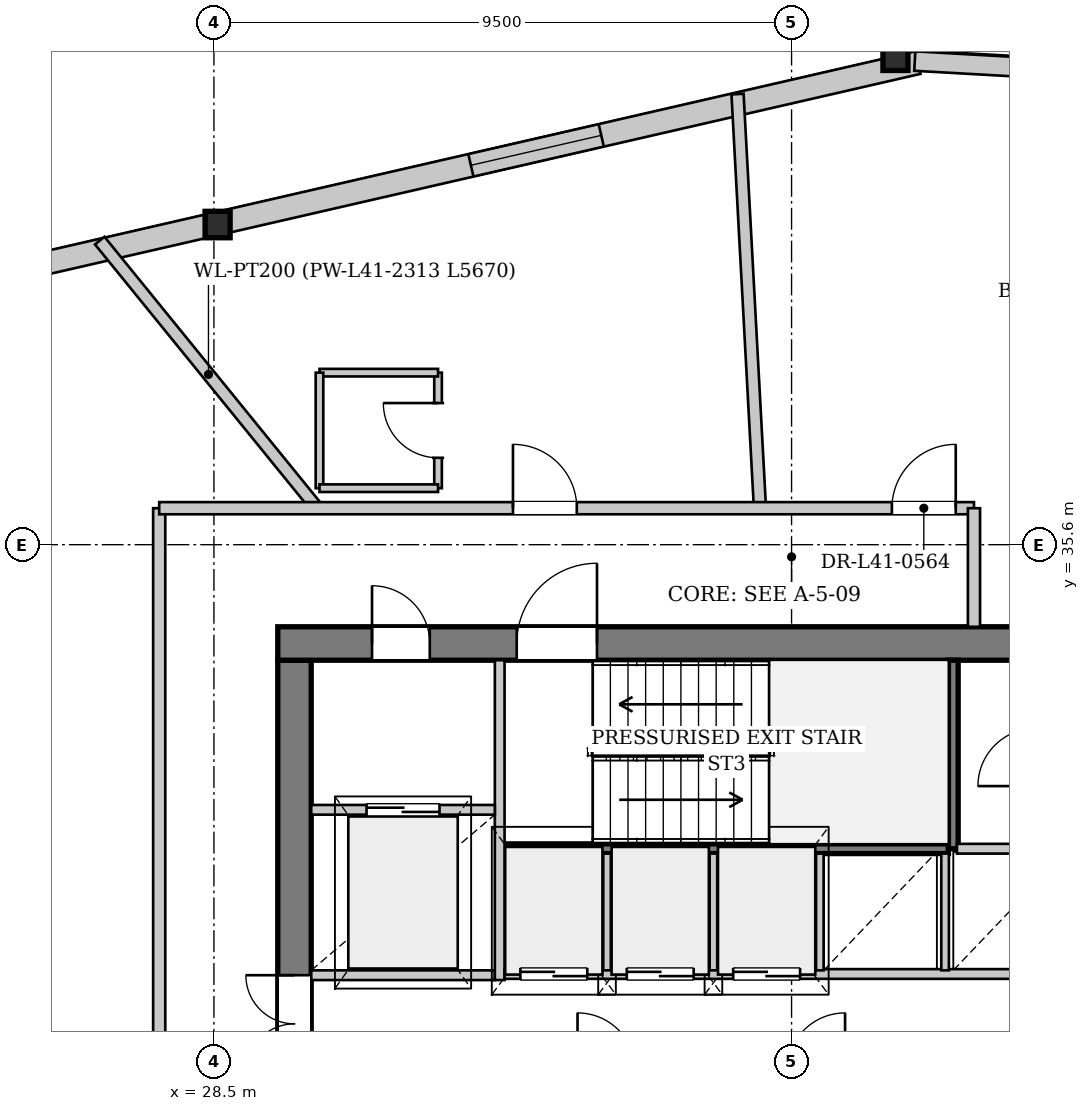
"""IFC4 building model, lengths in metres.
Left out: names, types, materials, properties, quantities, classifications, styles, units other than length and angle.
Written with IfcOpenShell. Run it as: python <this file> out.ifc"""

import sys

from ifc_helpers import new_model, si_unit, direction, frame, frame_2d, origin, origin_2d, place, context, subcontext, project, spatial, rectangle, i_section, extrude, source, transform, mapped, element, fill, save


model = new_model("IFC4")
c1 = context("Model", 3, precision=1e-05, world=origin(), true_north=direction((0.0, 1.0)))
c2 = subcontext(c1, "Body", "Model", "MODEL_VIEW")
j1 = project(units=[si_unit("LENGTHUNIT", "METRE"), si_unit("PLANEANGLEUNIT", "RADIAN")], contexts=[c1])
p1 = place(None, origin())
s1 = spatial("IfcSite", under=j1, at=p1, CompositionType="ELEMENT")
p2 = place(p1, origin())
s2 = spatial("IfcBuilding", under=s1, at=p2, CompositionType="ELEMENT")
p3 = place(p2, frame((0.0, 0.0, 157.25)))
s3 = spatial("IfcBuildingStorey", under=s2, at=p3, CompositionType="ELEMENT", Elevation=157.25)
m1 = source(origin(), c2, "Body", "SweptSolid", [
    extrude(i_section(OverallWidth=0.412, OverallDepth=0.435, WebThickness=0.031, FlangeThickness=0.05, at=origin_2d()), origin(), (0.0, 0.0, 1.0), 3.453),
])
p4 = place(p3, frame((40.035, 43.713, 0.0), z_axis=(-0.189343347232, -0.056209096733, 0.980300787668), x_axis=(0.284588007849, -0.958649918264, 0.0)))
e1 = element("IfcColumn", 1, at=p4, inside=s3, PredefinedType="COLUMN", context=c2, shape_type="MappedRepresentation", body=[
    mapped(m1, transform((0.0, 0.0, 0.0), x_axis=(1.0, 0.0, 0.0), y_axis=(0.0, 1.0, 0.0), z_axis=(0.0, 0.0, 1.0), scale=1.0)),
])
m2 = source(origin(), c2, "Body", "SweptSolid", [
    extrude(i_section(OverallWidth=0.412, OverallDepth=0.435, WebThickness=0.031, FlangeThickness=0.05, at=origin_2d()), origin(), (0.0, 0.0, 1.0), 3.468),
])
p5 = place(p3, frame((28.821, 41.136, 0.0), z_axis=(-0.150241736918, -0.156718887713, 0.97614886709), x_axis=(0.721866695766, -0.692032133317, 0.0)))
e2 = element("IfcColumn", 2, at=p5, inside=s3, PredefinedType="COLUMN", context=c2, shape_type="MappedRepresentation", body=[
    mapped(m2, transform((0.0, 0.0, 0.0), x_axis=(1.0, 0.0, 0.0), y_axis=(0.0, 1.0, 0.0), z_axis=(0.0, 0.0, 1.0), scale=1.0)),
])
p6 = place(p3, frame((17.649, 38.375, 0.0), z_axis=(0.0, 0.0, 1.0), x_axis=(0.974613320318, 0.223894787475, 0.0)))
e3 = element("IfcWall", 3, at=p6, inside=s3, PredefinedType="SOLIDWALL", context=c2, shape_type="SweptSolid", body=[
    extrude(rectangle(XDim=23.013, YDim=0.38, at=frame_2d((11.507, 0.0))), origin(), (0.0, 0.0, 1.0), 2.722),
])
p7 = place(p6, frame((5.344, 0.0, 0.352)))
e4 = element("IfcOpeningElement", 4, at=p7, cuts=e3, PredefinedType="OPENING", context=c2, shape_type="SweptSolid", body=[
    extrude(rectangle(XDim=2.2, YDim=2.25, at=frame_2d((1.1, 1.125))), frame((0.0, 0.2, 0.0), z_axis=(0.0, -1.0, 0.0), x_axis=(1.0, 0.0, 0.0)), (0.0, 0.0, 1.0), 0.4),
])
p8 = place(p6, frame((15.47, 0.0, 0.352)))
e5 = element("IfcOpeningElement", 5, at=p8, cuts=e3, PredefinedType="OPENING", context=c2, shape_type="SweptSolid", body=[
    extrude(rectangle(XDim=2.2, YDim=2.25, at=frame_2d((1.1, 1.125))), frame((0.0, 0.2, 0.0), z_axis=(0.0, -1.0, 0.0), x_axis=(1.0, 0.0, 0.0)), (0.0, 0.0, 1.0), 0.4),
])
p9 = place(p3, frame((40.027, 43.553, 0.0), z_axis=(0.0, 0.0, 1.0), x_axis=(0.998410901797, -0.056353093731, 0.0)))
e6 = element("IfcWall", 6, at=p9, inside=s3, PredefinedType="SOLIDWALL", context=c2, shape_type="SweptSolid", body=[
    extrude(rectangle(XDim=23.013, YDim=0.32, at=frame_2d((11.507, 0.0))), origin(), (0.0, 0.0, 1.0), 2.722),
])
p10 = place(p9, frame((6.614, 0.0, 0.0)))
e7 = element("IfcOpeningElement", 7, at=p10, cuts=e6, PredefinedType="OPENING", context=c2, shape_type="SweptSolid", body=[
    extrude(rectangle(XDim=1.5, YDim=2.3, at=frame_2d((0.75, 1.15))), frame((0.0, 0.17, 0.0), z_axis=(0.0, -1.0, 0.0), x_axis=(1.0, 0.0, 0.0)), (0.0, 0.0, 1.0), 0.34),
])
p11 = place(p9, frame((15.73, 0.0, 0.252)))
e8 = element("IfcOpeningElement", 8, at=p11, cuts=e6, PredefinedType="OPENING", context=c2, shape_type="SweptSolid", body=[
    extrude(rectangle(XDim=2.6, YDim=2.35, at=frame_2d((1.3, 1.175))), frame((0.0, 0.17, 0.0), z_axis=(0.0, -1.0, 0.0), x_axis=(1.0, 0.0, 0.0)), (0.0, 0.0, 1.0), 0.34),
])
p12 = place(p3, frame((29.825, 19.5, 0.0), z_axis=(0.0, 0.0, 1.0), x_axis=(0.0, 1.0, 0.0)))
e9 = element("IfcWall", 9, at=p12, inside=s3, PredefinedType="SHEAR", context=c2, shape_type="SweptSolid", body=[
    extrude(rectangle(XDim=14.2, YDim=0.55, at=frame_2d((7.1, 0.0))), origin(), (0.0, 0.0, 1.0), 3.33),
])
p13 = place(p12, frame((7.42, 0.0, 0.0)))
e10 = element("IfcOpeningElement", 10, at=p13, cuts=e9, PredefinedType="OPENING", context=c2, shape_type="SweptSolid", body=[
    extrude(rectangle(XDim=1.6, YDim=2.2, at=frame_2d((0.8, 1.1))), frame((0.0, 0.285, 0.0), z_axis=(0.0, -1.0, 0.0), x_axis=(1.0, 0.0, 0.0)), (0.0, 0.0, 1.0), 0.57),
])
p14 = place(p3, frame((29.55, 33.975, 0.0), z_axis=(0.0, 0.0, 1.0), x_axis=(1.0, 0.0, 0.0)))
e11 = element("IfcWall", 11, at=p14, inside=s3, PredefinedType="SHEAR", context=c2, shape_type="SweptSolid", body=[
    extrude(rectangle(XDim=16.9, YDim=0.55, at=frame_2d((8.45, 0.0))), origin(), (0.0, 0.0, 1.0), 3.33),
])
p15 = place(p14, frame((1.55, 0.0, 0.0)))
e12 = element("IfcOpeningElement", 12, at=p15, cuts=e11, PredefinedType="OPENING", context=c2, shape_type="SweptSolid", body=[
    extrude(rectangle(XDim=0.95, YDim=2.1, at=frame_2d((0.475, 1.05))), frame((0.0, 0.285, 0.0), z_axis=(0.0, -1.0, 0.0), x_axis=(1.0, 0.0, 0.0)), (0.0, 0.0, 1.0), 0.57),
])
p16 = place(p14, frame((3.93, 0.0, 0.0)))
e13 = element("IfcOpeningElement", 13, at=p16, cuts=e11, PredefinedType="OPENING", context=c2, shape_type="SweptSolid", body=[
    extrude(rectangle(XDim=1.32, YDim=2.2, at=frame_2d((0.66, 1.1))), frame((0.0, 0.285, 0.0), z_axis=(0.0, -1.0, 0.0), x_axis=(1.0, 0.0, 0.0)), (0.0, 0.0, 1.0), 0.57),
])
p17 = place(p3, frame((33.28, 30.6, 0.0), z_axis=(0.0, 0.0, 1.0), x_axis=(1.0, 0.0, 0.0)))
e14 = element("IfcWall", 14, at=p17, inside=s3, PredefinedType="PARTITIONING", context=c2, shape_type="SweptSolid", body=[
    extrude(rectangle(XDim=7.3, YDim=0.16, at=frame_2d((3.65, 0.0))), origin(), (0.0, 0.0, 1.0), 3.33),
])
p18 = place(p3, frame((40.66, 30.6, 0.0), z_axis=(0.0, 0.0, 1.0), x_axis=(0.0, 1.0, 0.0)))
e15 = element("IfcWall", 15, at=p18, inside=s3, PredefinedType="PARTITIONING", context=c2, shape_type="SweptSolid", body=[
    extrude(rectangle(XDim=3.1, YDim=0.16, at=frame_2d((1.55, 0.0))), origin(), (0.0, 0.0, 1.0), 3.33),
])
p19 = place(p3, frame((30.1, 28.52, 0.0), z_axis=(0.0, 0.0, 1.0), x_axis=(1.0, 0.0, 0.0)))
e16 = element("IfcWall", 16, at=p19, inside=s3, PredefinedType="PARTITIONING", context=c2, shape_type="SweptSolid", body=[
    extrude(rectangle(XDim=3.02, YDim=0.16, at=frame_2d((1.51, 0.0))), origin(), (0.0, 0.0, 1.0), 3.33),
])
p20 = place(p3, frame((33.2, 28.44, 0.0), z_axis=(0.0, 0.0, 1.0), x_axis=(0.0, 1.0, 0.0)))
e17 = element("IfcWall", 17, at=p20, inside=s3, PredefinedType="PARTITIONING", context=c2, shape_type="SweptSolid", body=[
    extrude(rectangle(XDim=5.26, YDim=0.16, at=frame_2d((2.63, 0.0))), origin(), (0.0, 0.0, 1.0), 3.33),
])
p21 = place(p3, frame((30.1, 31.24, 0.0), z_axis=(0.0, 0.0, 1.0), x_axis=(1.0, 0.0, 0.0)))
e18 = element("IfcWall", 18, at=p21, inside=s3, PredefinedType="PARTITIONING", context=c2, shape_type="SweptSolid", body=[
    extrude(rectangle(XDim=3.02, YDim=0.16, at=frame_2d((1.51, 0.0))), origin(), (0.0, 0.0, 1.0), 3.33),
])
p22 = place(p21, frame((0.91, 0.0, 0.0)))
e19 = element("IfcOpeningElement", 19, at=p22, cuts=e18, PredefinedType="OPENING", context=c2, shape_type="SweptSolid", body=[
    extrude(rectangle(XDim=1.2, YDim=2.2, at=frame_2d((0.6, 1.1))), frame((0.0, 0.09, 0.0), z_axis=(0.0, -1.0, 0.0), x_axis=(1.0, 0.0, 0.0)), (0.0, 0.0, 1.0), 0.18),
])
p23 = place(p3, frame((33.28, 28.54, 0.0), z_axis=(0.0, 0.0, 1.0), x_axis=(1.0, 0.0, 0.0)))
e20 = element("IfcWall", 20, at=p23, inside=s3, PredefinedType="PARTITIONING", context=c2, shape_type="SweptSolid", body=[
    extrude(rectangle(XDim=12.62, YDim=0.16, at=frame_2d((6.31, 0.0))), origin(), (0.0, 0.0, 1.0), 3.33),
])
p24 = place(p23, frame((0.26, 0.0, 0.0)))
e21 = element("IfcOpeningElement", 21, at=p24, cuts=e20, PredefinedType="OPENING", context=c2, shape_type="SweptSolid", body=[
    extrude(rectangle(XDim=1.1, YDim=2.2, at=frame_2d((0.55, 1.1))), frame((0.0, 0.09, 0.0), z_axis=(0.0, -1.0, 0.0), x_axis=(1.0, 0.0, 0.0)), (0.0, 0.0, 1.0), 0.18),
])
p25 = place(p23, frame((2.01, 0.0, 0.0)))
e22 = element("IfcOpeningElement", 22, at=p25, cuts=e20, PredefinedType="OPENING", context=c2, shape_type="SweptSolid", body=[
    extrude(rectangle(XDim=1.1, YDim=2.2, at=frame_2d((0.55, 1.1))), frame((0.0, 0.09, 0.0), z_axis=(0.0, -1.0, 0.0), x_axis=(1.0, 0.0, 0.0)), (0.0, 0.0, 1.0), 0.18),
])
p26 = place(p23, frame((3.76, 0.0, 0.0)))
e23 = element("IfcOpeningElement", 23, at=p26, cuts=e20, PredefinedType="OPENING", context=c2, shape_type="SweptSolid", body=[
    extrude(rectangle(XDim=1.1, YDim=2.2, at=frame_2d((0.55, 1.1))), frame((0.0, 0.09, 0.0), z_axis=(0.0, -1.0, 0.0), x_axis=(1.0, 0.0, 0.0)), (0.0, 0.0, 1.0), 0.18),
])
p27 = place(p3, frame((40.72, 30.6, 0.0), z_axis=(0.0, 0.0, 1.0), x_axis=(1.0, 0.0, 0.0)))
e24 = element("IfcWall", 24, at=p27, inside=s3, PredefinedType="PARTITIONING", context=c2, shape_type="SweptSolid", body=[
    extrude(rectangle(XDim=5.18, YDim=0.16, at=frame_2d((2.59, 0.0))), origin(), (0.0, 0.0, 1.0), 3.33),
])
for number, where, z_axis, x_axis in (
    (25, (34.965, 28.6, 0.0), (0.0, 0.0, 1.0), (0.0, 1.0, 0.0)),
    (26, (36.715, 28.6, 0.0), (0.0, 0.0, 1.0), (0.0, 1.0, 0.0)),
    (27, (38.465, 28.6, 0.0), (0.0, 0.0, 1.0), (0.0, 1.0, 0.0)),
    (28, (40.525, 28.6, 0.0), (0.0, 0.0, 1.0), (0.0, 1.0, 0.0)),
):
    element("IfcWall", number, at=place(p3, frame(where, z_axis=z_axis, x_axis=x_axis)), inside=s3, PredefinedType="PARTITIONING", context=c2, shape_type="SweptSolid", body=[
        extrude(rectangle(XDim=1.92, YDim=0.125, at=frame_2d((0.96, 0.0))), origin(), (0.0, 0.0, 1.0), 3.33),
    ])
p28 = place(p3, frame((30.198, 36.2, 0.0), z_axis=(0.0, 0.0, 1.0), x_axis=(-0.63066232019, 0.776057367656, 0.0)))
e29 = element("IfcWall", 29, at=p28, inside=s3, PredefinedType="PARTITIONING", context=c2, shape_type="SweptSolid", body=[
    extrude(rectangle(XDim=5.67, YDim=0.2, at=frame_2d((2.835, 0.0))), origin(), (0.0, 0.0, 1.0), 3.33),
])
p29 = place(p3, frame((37.48, 36.2, 0.0), z_axis=(0.0, 0.0, 1.0), x_axis=(-0.054052429799, 0.998538098839, 0.0)))
e30 = element("IfcWall", 30, at=p29, inside=s3, PredefinedType="PARTITIONING", context=c2, shape_type="SweptSolid", body=[
    extrude(rectangle(XDim=6.82, YDim=0.2, at=frame_2d((3.41, 0.0))), origin(), (0.0, 0.0, 1.0), 3.33),
])
p30 = place(p3, frame((32.186, 36.529, 0.0), z_axis=(0.0, 0.0, 1.0), x_axis=(0.0, 1.0, 0.0)))
e31 = element("IfcWall", 31, at=p30, inside=s3, PredefinedType="PARTITIONING", context=c2, shape_type="SweptSolid", body=[
    extrude(rectangle(XDim=1.9, YDim=0.125, at=frame_2d((0.95, 0.0))), origin(), (0.0, 0.0, 1.0), 3.33),
])
p31 = place(p30, frame((0.5, 0.0, 0.0)))
e32 = element("IfcOpeningElement", 32, at=p31, cuts=e31, PredefinedType="OPENING", context=c2, shape_type="SweptSolid", body=[
    extrude(rectangle(XDim=0.9, YDim=2.1, at=frame_2d((0.45, 1.05))), frame((0.0, 0.073, 0.0), z_axis=(0.0, -1.0, 0.0), x_axis=(1.0, 0.0, 0.0)), (0.0, 0.0, 1.0), 0.145),
])
p32 = place(p3, frame((32.186, 38.429, 0.0), z_axis=(0.0, 0.0, 1.0), x_axis=(-1.0, 0.0, 0.0)))
e33 = element("IfcWall", 33, at=p32, inside=s3, PredefinedType="PARTITIONING", context=c2, shape_type="SweptSolid", body=[
    extrude(rectangle(XDim=1.95, YDim=0.125, at=frame_2d((0.975, 0.0))), origin(), (0.0, 0.0, 1.0), 3.33),
])
p33 = place(p3, frame((30.236, 38.429, 0.0), z_axis=(0.0, 0.0, 1.0), x_axis=(0.0, -1.0, 0.0)))
e34 = element("IfcWall", 34, at=p33, inside=s3, PredefinedType="PARTITIONING", context=c2, shape_type="SweptSolid", body=[
    extrude(rectangle(XDim=1.9, YDim=0.125, at=frame_2d((0.95, 0.0))), origin(), (0.0, 0.0, 1.0), 3.33),
])
p34 = place(p3, frame((30.236, 36.529, 0.0), z_axis=(0.0, 0.0, 1.0), x_axis=(1.0, 0.0, 0.0)))
e35 = element("IfcWall", 35, at=p34, inside=s3, PredefinedType="PARTITIONING", context=c2, shape_type="SweptSolid", body=[
    extrude(rectangle(XDim=1.95, YDim=0.125, at=frame_2d((0.975, 0.0))), origin(), (0.0, 0.0, 1.0), 3.33),
])
p35 = place(p3, frame((27.6, 17.0, 0.0), z_axis=(0.0, 0.0, 1.0), x_axis=(0.0, 1.0, 0.0)))
e36 = element("IfcWall", 36, at=p35, inside=s3, PredefinedType="PARTITIONING", context=c2, shape_type="SweptSolid", body=[
    extrude(rectangle(XDim=19.2, YDim=0.2, at=frame_2d((9.6, 0.0))), origin(), (0.0, 0.0, 1.0), 3.33),
])
p36 = place(p3, frame((27.6, 36.2, 0.0), z_axis=(0.0, 0.0, 1.0), x_axis=(1.0, 0.0, 0.0)))
e37 = element("IfcWall", 37, at=p36, inside=s3, PredefinedType="PARTITIONING", context=c2, shape_type="SweptSolid", body=[
    extrude(rectangle(XDim=13.4, YDim=0.2, at=frame_2d((6.7, 0.0))), origin(), (0.0, 0.0, 1.0), 3.33),
])
p37 = place(p36, frame((12.05, 0.0, 0.0)))
e38 = element("IfcOpeningElement", 38, at=p37, cuts=e37, PredefinedType="OPENING", context=c2, shape_type="SweptSolid", body=[
    extrude(rectangle(XDim=1.05, YDim=2.2, at=frame_2d((0.525, 1.1))), frame((0.0, 0.11, 0.0), z_axis=(0.0, -1.0, 0.0), x_axis=(1.0, 0.0, 0.0)), (0.0, 0.0, 1.0), 0.22),
])
p38 = place(p36, frame((5.818, 0.0, 0.0)))
e39 = element("IfcOpeningElement", 39, at=p38, cuts=e37, PredefinedType="OPENING", context=c2, shape_type="SweptSolid", body=[
    extrude(rectangle(XDim=1.05, YDim=2.2, at=frame_2d((0.525, 1.1))), frame((0.0, 0.11, 0.0), z_axis=(0.0, -1.0, 0.0), x_axis=(1.0, 0.0, 0.0)), (0.0, 0.0, 1.0), 0.22),
])
p39 = place(p3, frame((41.0, 34.25, 0.0), z_axis=(0.0, 0.0, 1.0), x_axis=(0.0, 1.0, 0.0)))
e40 = element("IfcWall", 40, at=p39, inside=s3, PredefinedType="PARTITIONING", context=c2, shape_type="SweptSolid", body=[
    extrude(rectangle(XDim=1.95, YDim=0.2, at=frame_2d((0.975, 0.0))), origin(), (0.0, 0.0, 1.0), 3.33),
])
m3 = source(origin(), c2, "Body", "SweptSolid", [
    extrude(rectangle(XDim=2.2, YDim=2.25, at=frame_2d((1.1, 1.125))), frame((0.0, 0.03, 0.0), z_axis=(0.0, -1.0, 0.0), x_axis=(1.0, 0.0, 0.0)), (0.0, 0.0, 1.0), 0.06),
])
p40 = place(p8, origin())
e41 = element("IfcWindow", 41, at=p40, inside=s3, PartitioningType="SINGLE_PANEL", PredefinedType="WINDOW", context=c2, shape_type="MappedRepresentation", body=[
    mapped(m3, transform((0.0, 0.0, 0.0), x_axis=(1.0, 0.0, 0.0), y_axis=(0.0, 1.0, 0.0), z_axis=(0.0, 0.0, 1.0), scale=1.0)),
])
fill(e5, e41)
m4 = source(origin(), c2, "Body", "SweptSolid", [
    extrude(rectangle(XDim=1.6, YDim=2.2, at=frame_2d((0.8, 1.1))), frame((0.0, 0.025, 0.0), z_axis=(0.0, -1.0, 0.0), x_axis=(1.0, 0.0, 0.0)), (0.0, 0.0, 1.0), 0.05),
])
p41 = place(p13, origin())
e42 = element("IfcDoor", 42, at=p41, inside=s3, OperationType="DOUBLE_DOOR_SINGLE_SWING", PredefinedType="DOOR", context=c2, shape_type="MappedRepresentation", body=[
    mapped(m4, transform((0.0, 0.0, 0.0), x_axis=(1.0, 0.0, 0.0), y_axis=(0.0, 1.0, 0.0), z_axis=(0.0, 0.0, 1.0), scale=1.0)),
])
fill(e10, e42)
m5 = source(origin(), c2, "Body", "SweptSolid", [
    extrude(rectangle(XDim=0.95, YDim=2.1, at=frame_2d((0.475, 1.05))), frame((0.0, 0.025, 0.0), z_axis=(0.0, -1.0, 0.0), x_axis=(1.0, 0.0, 0.0)), (0.0, 0.0, 1.0), 0.05),
])
p42 = place(p15, origin())
e43 = element("IfcDoor", 43, at=p42, inside=s3, OperationType="SINGLE_SWING_LEFT", PredefinedType="DOOR", context=c2, shape_type="MappedRepresentation", body=[
    mapped(m5, transform((0.0, 0.0, 0.0), x_axis=(1.0, 0.0, 0.0), y_axis=(0.0, 1.0, 0.0), z_axis=(0.0, 0.0, 1.0), scale=1.0)),
])
fill(e12, e43)
m6 = source(origin(), c2, "Body", "SweptSolid", [
    extrude(rectangle(XDim=1.32, YDim=2.2, at=frame_2d((0.66, 1.1))), frame((0.0, 0.025, 0.0), z_axis=(0.0, -1.0, 0.0), x_axis=(1.0, 0.0, 0.0)), (0.0, 0.0, 1.0), 0.05),
])
p43 = place(p16, origin())
e44 = element("IfcDoor", 44, at=p43, inside=s3, OperationType="SINGLE_SWING_RIGHT", PredefinedType="DOOR", context=c2, shape_type="MappedRepresentation", body=[
    mapped(m6, transform((0.0, 0.0, 0.0), x_axis=(1.0, 0.0, 0.0), y_axis=(0.0, 1.0, 0.0), z_axis=(0.0, 0.0, 1.0), scale=1.0)),
])
fill(e13, e44)
m7 = source(origin(), c2, "Body", "SweptSolid", [
    extrude(rectangle(XDim=1.2, YDim=2.2, at=frame_2d((0.6, 1.1))), frame((0.0, 0.025, 0.0), z_axis=(0.0, -1.0, 0.0), x_axis=(1.0, 0.0, 0.0)), (0.0, 0.0, 1.0), 0.05),
])
p44 = place(p22, origin())
e45 = element("IfcDoor", 45, at=p44, inside=s3, OperationType="DOUBLE_DOOR_SLIDING", PredefinedType="DOOR", context=c2, shape_type="MappedRepresentation", body=[
    mapped(m7, transform((0.0, 0.0, 0.0), x_axis=(1.0, 0.0, 0.0), y_axis=(0.0, 1.0, 0.0), z_axis=(0.0, 0.0, 1.0), scale=1.0)),
])
fill(e19, e45)
m8 = source(origin(), c2, "Body", "SweptSolid", [
    extrude(rectangle(XDim=1.1, YDim=2.2, at=frame_2d((0.55, 1.1))), frame((0.0, 0.025, 0.0), z_axis=(0.0, -1.0, 0.0), x_axis=(1.0, 0.0, 0.0)), (0.0, 0.0, 1.0), 0.05),
])
p45 = place(p24, origin())
e46 = element("IfcDoor", 46, at=p45, inside=s3, OperationType="DOUBLE_DOOR_SLIDING", PredefinedType="DOOR", context=c2, shape_type="MappedRepresentation", body=[
    mapped(m8, transform((0.0, 0.0, 0.0), x_axis=(1.0, 0.0, 0.0), y_axis=(0.0, 1.0, 0.0), z_axis=(0.0, 0.0, 1.0), scale=1.0)),
])
fill(e21, e46)
p46 = place(p25, origin())
e47 = element("IfcDoor", 47, at=p46, inside=s3, OperationType="DOUBLE_DOOR_SLIDING", PredefinedType="DOOR", context=c2, shape_type="MappedRepresentation", body=[
    mapped(m8, transform((0.0, 0.0, 0.0), x_axis=(1.0, 0.0, 0.0), y_axis=(0.0, 1.0, 0.0), z_axis=(0.0, 0.0, 1.0), scale=1.0)),
])
fill(e22, e47)
p47 = place(p26, origin())
e48 = element("IfcDoor", 48, at=p47, inside=s3, OperationType="DOUBLE_DOOR_SLIDING", PredefinedType="DOOR", context=c2, shape_type="MappedRepresentation", body=[
    mapped(m8, transform((0.0, 0.0, 0.0), x_axis=(1.0, 0.0, 0.0), y_axis=(0.0, 1.0, 0.0), z_axis=(0.0, 0.0, 1.0), scale=1.0)),
])
fill(e23, e48)
m9 = source(origin(), c2, "Body", "SweptSolid", [
    extrude(rectangle(XDim=0.9, YDim=2.1, at=frame_2d((0.45, 1.05))), frame((0.0, 0.025, 0.0), z_axis=(0.0, -1.0, 0.0), x_axis=(1.0, 0.0, 0.0)), (0.0, 0.0, 1.0), 0.05),
])
p48 = place(p31, origin())
e49 = element("IfcDoor", 49, at=p48, inside=s3, OperationType="SINGLE_SWING_RIGHT", PredefinedType="DOOR", context=c2, shape_type="MappedRepresentation", body=[
    mapped(m9, transform((0.0, 0.0, 0.0), x_axis=(1.0, 0.0, 0.0), y_axis=(0.0, 1.0, 0.0), z_axis=(0.0, 0.0, 1.0), scale=1.0)),
])
fill(e32, e49)
m10 = source(origin(), c2, "Body", "SweptSolid", [
    extrude(rectangle(XDim=1.05, YDim=2.2, at=frame_2d((0.525, 1.1))), frame((0.0, 0.025, 0.0), z_axis=(0.0, -1.0, 0.0), x_axis=(1.0, 0.0, 0.0)), (0.0, 0.0, 1.0), 0.05),
])
p49 = place(p37, origin())
e50 = element("IfcDoor", 50, at=p49, inside=s3, OperationType="SINGLE_SWING_RIGHT", PredefinedType="DOOR", context=c2, shape_type="MappedRepresentation", body=[
    mapped(m10, transform((0.0, 0.0, 0.0), x_axis=(1.0, 0.0, 0.0), y_axis=(0.0, 1.0, 0.0), z_axis=(0.0, 0.0, 1.0), scale=1.0)),
])
fill(e38, e50)
p50 = place(p38, origin())
e51 = element("IfcDoor", 51, at=p50, inside=s3, OperationType="SINGLE_SWING_LEFT", PredefinedType="DOOR", context=c2, shape_type="MappedRepresentation", body=[
    mapped(m10, transform((0.0, 0.0, 0.0), x_axis=(1.0, 0.0, 0.0), y_axis=(0.0, 1.0, 0.0), z_axis=(0.0, 0.0, 1.0), scale=1.0)),
])
fill(e39, e51)
save(model, sys.argv[1])
